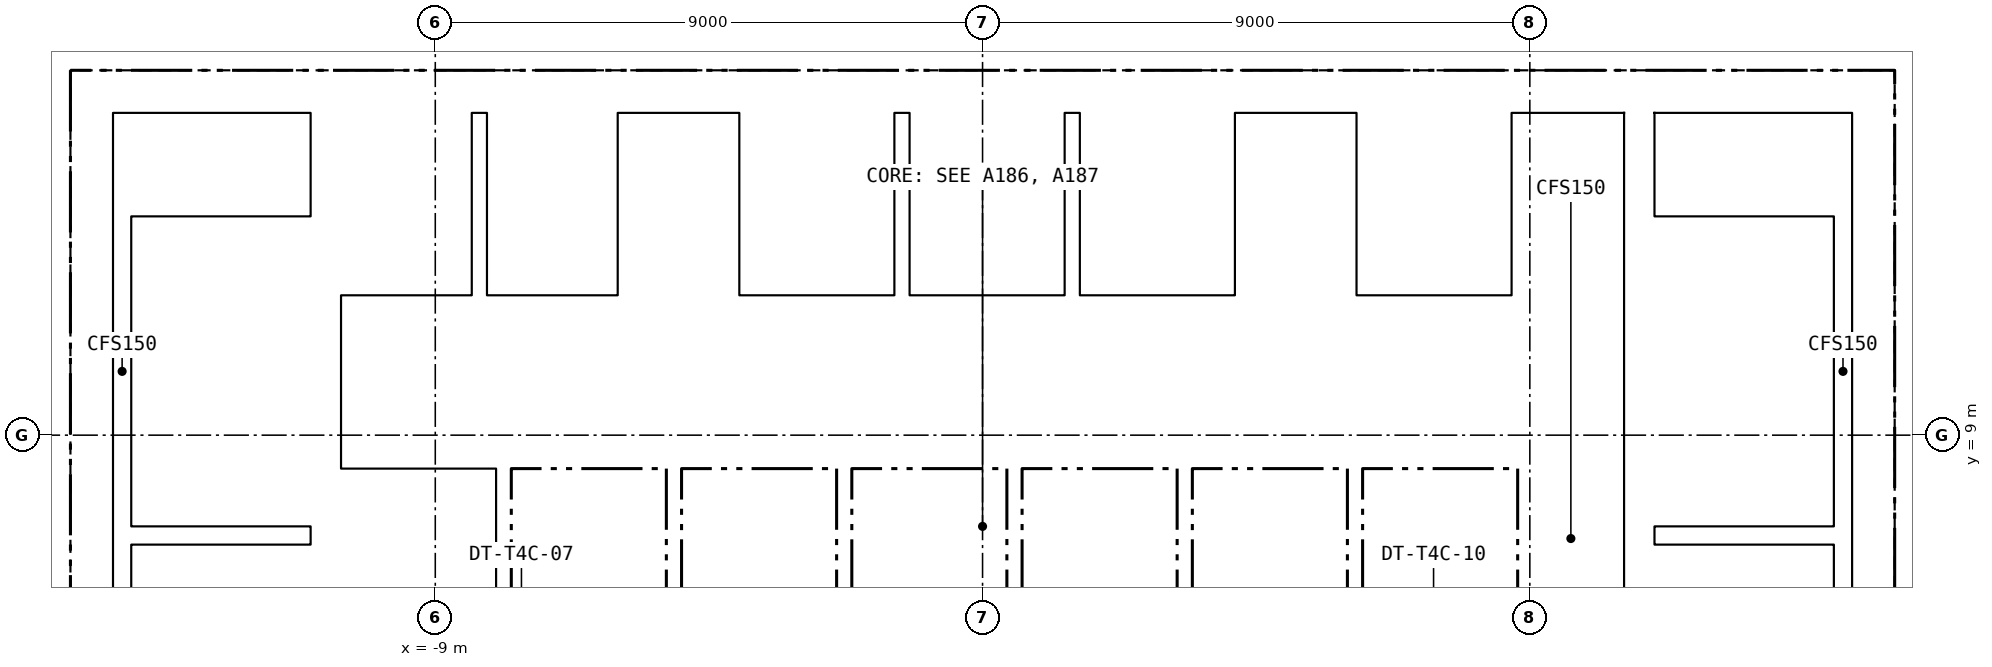
"""IFC4 building model, lengths in metres.
Left out: names, types, materials, properties, quantities, classifications, styles, units other than length and angle.
Written with IfcOpenShell. Run it as: python <this file> out.ifc"""

import sys

from ifc_helpers import new_model, si_unit, direction, frame, frame_2d, origin, place, context, subcontext, project, spatial, rectangle, extrude, element, fill, save


model = new_model("IFC4")
c1 = context("Model", 3, precision=1e-05, world=origin(), true_north=direction((0.0, 1.0)))
c2 = subcontext(c1, "Body", "Model", "MODEL_VIEW")
j1 = project(units=[si_unit("LENGTHUNIT", "METRE"), si_unit("PLANEANGLEUNIT", "RADIAN")], contexts=[c1])
p1 = place(None, origin())
s1 = spatial("IfcSite", under=j1, at=p1, CompositionType="ELEMENT")
p2 = place(p1, origin())
s2 = spatial("IfcBuilding", under=s1, at=p2, CompositionType="ELEMENT")
p3 = place(p2, frame((0.0, 0.0, 192.7)))
s3 = spatial("IfcBuildingStorey", under=s2, at=p3, CompositionType="ELEMENT", Elevation=192.7)
p4 = place(p3, frame((-15.0, 14.65, -0.15), z_axis=(0.0, 0.0, 1.0), x_axis=(1.0, 0.0, 0.0)))
e1 = element("IfcWall", 1, at=p4, inside=s3, PredefinedType="SOLIDWALL", context=c2, shape_type="SweptSolid", body=[
    extrude(rectangle(XDim=30.0, YDim=0.7, at=frame_2d((15.0, 0.0))), origin(), (0.0, 0.0, 1.0), 3.65),
])
p5 = place(p4, frame((9.25, 0.0, 0.15)))
e2 = element("IfcOpeningElement", 2, at=p5, cuts=e1, PredefinedType="OPENING", context=c2, shape_type="SweptSolid", body=[
    extrude(rectangle(XDim=1.5, YDim=2.1, at=frame_2d((0.75, 1.05))), frame((0.0, 0.36, 0.0), z_axis=(0.0, -1.0, 0.0), x_axis=(1.0, 0.0, 0.0)), (0.0, 0.0, 1.0), 0.72),
])
p6 = place(p4, frame((19.4, 0.0, 0.15)))
e3 = element("IfcOpeningElement", 3, at=p6, cuts=e1, PredefinedType="OPENING", context=c2, shape_type="SweptSolid", body=[
    extrude(rectangle(XDim=1.5, YDim=2.1, at=frame_2d((0.75, 1.05))), frame((0.0, 0.36, 0.0), z_axis=(0.0, -1.0, 0.0), x_axis=(1.0, 0.0, 0.0)), (0.0, 0.0, 1.0), 0.72),
])
p7 = place(p4, frame((1.5, 0.0, 0.15)))
e4 = element("IfcOpeningElement", 4, at=p7, cuts=e1, PredefinedType="OPENING", context=c2, shape_type="SweptSolid", body=[
    extrude(rectangle(XDim=1.2, YDim=2.1, at=frame_2d((0.6, 1.05))), frame((0.0, 0.36, 0.0), z_axis=(0.0, -1.0, 0.0), x_axis=(1.0, 0.0, 0.0)), (0.0, 0.0, 1.0), 0.72),
])
p8 = place(p4, frame((27.3, 0.0, 0.15)))
e5 = element("IfcOpeningElement", 5, at=p8, cuts=e1, PredefinedType="OPENING", context=c2, shape_type="SweptSolid", body=[
    extrude(rectangle(XDim=1.2, YDim=2.1, at=frame_2d((0.6, 1.05))), frame((0.0, 0.36, 0.0), z_axis=(0.0, -1.0, 0.0), x_axis=(1.0, 0.0, 0.0)), (0.0, 0.0, 1.0), 0.72),
])
for number, where, z_axis, x_axis in (
    (6, (-14.65, 0.7, -0.15), (0.0, 0.0, 1.0), (0.0, 1.0, 0.0)),
    (7, (14.65, 0.7, -0.15), (0.0, 0.0, 1.0), (0.0, 1.0, 0.0)),
):
    element("IfcWall", number, at=place(p3, frame(where, z_axis=z_axis, x_axis=x_axis)), inside=s3, PredefinedType="SOLIDWALL", context=c2, shape_type="SweptSolid", body=[
        extrude(rectangle(XDim=13.6, YDim=0.7, at=frame_2d((6.8, 0.0))), origin(), (0.0, 0.0, 1.0), 3.65),
    ])
for number, where, z_axis, x_axis in (
    (8, (-10.8, 0.7, -0.15), (0.0, 0.0, 1.0), (0.0, 1.0, 0.0)),
    (9, (10.8, 0.7, -0.15), (0.0, 0.0, 1.0), (0.0, 1.0, 0.0)),
):
    element("IfcWall", number, at=place(p3, frame(where, z_axis=z_axis, x_axis=x_axis)), inside=s3, PredefinedType="SOLIDWALL", context=c2, shape_type="SweptSolid", body=[
        extrude(rectangle(XDim=13.6, YDim=0.5, at=frame_2d((6.8, 0.0))), origin(), (0.0, 0.0, 1.0), 3.65),
    ])
p9 = place(p3, frame((-10.55, 8.55, 0.0), z_axis=(0.0, 0.0, 1.0), x_axis=(1.0, 0.0, 0.0)))
e10 = element("IfcWall", 10, at=p9, inside=s3, PredefinedType="PARTITIONING", context=c2, shape_type="SweptSolid", body=[
    extrude(rectangle(XDim=21.1, YDim=0.2, at=frame_2d((10.55, 0.0))), origin(), (0.0, 0.0, 1.0), 3.5),
])
p10 = place(p9, frame((0.675, 0.0, 0.0)))
e11 = element("IfcOpeningElement", 11, at=p10, cuts=e10, PredefinedType="OPENING", context=c2, shape_type="SweptSolid", body=[
    extrude(rectangle(XDim=1.2, YDim=2.1, at=frame_2d((0.6, 1.05))), frame((0.0, 0.11, 0.0), z_axis=(0.0, -1.0, 0.0), x_axis=(1.0, 0.0, 0.0)), (0.0, 0.0, 1.0), 0.22),
])
p11 = place(p9, frame((3.475, 0.0, 0.0)))
e12 = element("IfcOpeningElement", 12, at=p11, cuts=e10, PredefinedType="OPENING", context=c2, shape_type="SweptSolid", body=[
    extrude(rectangle(XDim=1.2, YDim=2.1, at=frame_2d((0.6, 1.05))), frame((0.0, 0.11, 0.0), z_axis=(0.0, -1.0, 0.0), x_axis=(1.0, 0.0, 0.0)), (0.0, 0.0, 1.0), 0.22),
])
p12 = place(p9, frame((6.275, 0.0, 0.0)))
e13 = element("IfcOpeningElement", 13, at=p12, cuts=e10, PredefinedType="OPENING", context=c2, shape_type="SweptSolid", body=[
    extrude(rectangle(XDim=1.2, YDim=2.1, at=frame_2d((0.6, 1.05))), frame((0.0, 0.11, 0.0), z_axis=(0.0, -1.0, 0.0), x_axis=(1.0, 0.0, 0.0)), (0.0, 0.0, 1.0), 0.22),
])
p13 = place(p9, frame((9.075, 0.0, 0.0)))
e14 = element("IfcOpeningElement", 14, at=p13, cuts=e10, PredefinedType="OPENING", context=c2, shape_type="SweptSolid", body=[
    extrude(rectangle(XDim=1.2, YDim=2.1, at=frame_2d((0.6, 1.05))), frame((0.0, 0.11, 0.0), z_axis=(0.0, -1.0, 0.0), x_axis=(1.0, 0.0, 0.0)), (0.0, 0.0, 1.0), 0.22),
])
p14 = place(p9, frame((11.875, 0.0, 0.0)))
e15 = element("IfcOpeningElement", 15, at=p14, cuts=e10, PredefinedType="OPENING", context=c2, shape_type="SweptSolid", body=[
    extrude(rectangle(XDim=1.2, YDim=2.1, at=frame_2d((0.6, 1.05))), frame((0.0, 0.11, 0.0), z_axis=(0.0, -1.0, 0.0), x_axis=(1.0, 0.0, 0.0)), (0.0, 0.0, 1.0), 0.22),
])
p15 = place(p9, frame((14.675, 0.0, 0.0)))
e16 = element("IfcOpeningElement", 16, at=p15, cuts=e10, PredefinedType="OPENING", context=c2, shape_type="SweptSolid", body=[
    extrude(rectangle(XDim=1.2, YDim=2.1, at=frame_2d((0.6, 1.05))), frame((0.0, 0.11, 0.0), z_axis=(0.0, -1.0, 0.0), x_axis=(1.0, 0.0, 0.0)), (0.0, 0.0, 1.0), 0.22),
])
p16 = place(p9, frame((17.475, 0.0, 0.0)))
e17 = element("IfcOpeningElement", 17, at=p16, cuts=e10, PredefinedType="OPENING", context=c2, shape_type="SweptSolid", body=[
    extrude(rectangle(XDim=1.2, YDim=2.1, at=frame_2d((0.6, 1.05))), frame((0.0, 0.11, 0.0), z_axis=(0.0, -1.0, 0.0), x_axis=(1.0, 0.0, 0.0)), (0.0, 0.0, 1.0), 0.22),
])
p17 = place(p9, frame((19.9, 0.0, 0.0)))
e18 = element("IfcOpeningElement", 18, at=p17, cuts=e10, PredefinedType="OPENING", context=c2, shape_type="SweptSolid", body=[
    extrude(rectangle(XDim=0.9, YDim=2.1, at=frame_2d((0.45, 1.05))), frame((0.0, 0.11, 0.0), z_axis=(0.0, -1.0, 0.0), x_axis=(1.0, 0.0, 0.0)), (0.0, 0.0, 1.0), 0.22),
])
p18 = place(p3, frame((-10.55, 11.2, 0.0), z_axis=(0.0, 0.0, 1.0), x_axis=(1.0, 0.0, 0.0)))
e19 = element("IfcWall", 19, at=p18, inside=s3, PredefinedType="PARTITIONING", context=c2, shape_type="SweptSolid", body=[
    extrude(rectangle(XDim=4.8, YDim=0.2, at=frame_2d((2.4, 0.0))), origin(), (0.0, 0.0, 1.0), 3.5),
])
p19 = place(p18, frame((0.525, 0.0, 0.0)))
e20 = element("IfcOpeningElement", 20, at=p19, cuts=e19, PredefinedType="OPENING", context=c2, shape_type="SweptSolid", body=[
    extrude(rectangle(XDim=1.1, YDim=2.1, at=frame_2d((0.55, 1.05))), frame((0.0, 0.11, 0.0), z_axis=(0.0, -1.0, 0.0), x_axis=(1.0, 0.0, 0.0)), (0.0, 0.0, 1.0), 0.22),
])
p20 = place(p18, frame((2.925, 0.0, 0.0)))
e21 = element("IfcOpeningElement", 21, at=p20, cuts=e19, PredefinedType="OPENING", context=c2, shape_type="SweptSolid", body=[
    extrude(rectangle(XDim=1.1, YDim=2.1, at=frame_2d((0.55, 1.05))), frame((0.0, 0.11, 0.0), z_axis=(0.0, -1.0, 0.0), x_axis=(1.0, 0.0, 0.0)), (0.0, 0.0, 1.0), 0.22),
])
p21 = place(p3, frame((-4.25, 11.2, 0.0), z_axis=(0.0, 0.0, 1.0), x_axis=(1.0, 0.0, 0.0)))
e22 = element("IfcWall", 22, at=p21, inside=s3, PredefinedType="PARTITIONING", context=c2, shape_type="SweptSolid", body=[
    extrude(rectangle(XDim=8.65, YDim=0.2, at=frame_2d((4.325, 0.0))), origin(), (0.0, 0.0, 1.0), 3.5),
])
p22 = place(p21, frame((0.825, 0.0, 0.0)))
e23 = element("IfcOpeningElement", 23, at=p22, cuts=e22, PredefinedType="OPENING", context=c2, shape_type="SweptSolid", body=[
    extrude(rectangle(XDim=1.4, YDim=2.1, at=frame_2d((0.7, 1.05))), frame((0.0, 0.11, 0.0), z_axis=(0.0, -1.0, 0.0), x_axis=(1.0, 0.0, 0.0)), (0.0, 0.0, 1.0), 0.22),
])
p23 = place(p21, frame((3.625, 0.0, 0.0)))
e24 = element("IfcOpeningElement", 24, at=p23, cuts=e22, PredefinedType="OPENING", context=c2, shape_type="SweptSolid", body=[
    extrude(rectangle(XDim=1.4, YDim=2.1, at=frame_2d((0.7, 1.05))), frame((0.0, 0.11, 0.0), z_axis=(0.0, -1.0, 0.0), x_axis=(1.0, 0.0, 0.0)), (0.0, 0.0, 1.0), 0.22),
])
p24 = place(p3, frame((5.9, 11.2, 0.0), z_axis=(0.0, 0.0, 1.0), x_axis=(1.0, 0.0, 0.0)))
e25 = element("IfcWall", 25, at=p24, inside=s3, PredefinedType="PARTITIONING", context=c2, shape_type="SweptSolid", body=[
    extrude(rectangle(XDim=4.65, YDim=0.2, at=frame_2d((2.325, 0.0))), origin(), (0.0, 0.0, 1.0), 3.5),
])
p25 = place(p24, frame((3.4, 0.0, 0.0)))
e26 = element("IfcOpeningElement", 26, at=p25, cuts=e25, PredefinedType="OPENING", context=c2, shape_type="SweptSolid", body=[
    extrude(rectangle(XDim=0.9, YDim=2.1, at=frame_2d((0.45, 1.05))), frame((0.0, 0.11, 0.0), z_axis=(0.0, -1.0, 0.0), x_axis=(1.0, 0.0, 0.0)), (0.0, 0.0, 1.0), 0.22),
])
p26 = place(p3, frame((-4.125, 8.65, 0.0), z_axis=(0.0, 0.0, 1.0), x_axis=(0.0, 1.0, 0.0)))
e27 = element("IfcWall", 27, at=p26, inside=s3, PredefinedType="PARTITIONING", context=c2, shape_type="SweptSolid", body=[
    extrude(rectangle(XDim=2.45, YDim=0.25, at=frame_2d((1.225, 0.0))), origin(), (0.0, 0.0, 1.0), 3.5),
])
p27 = place(p26, frame((0.625, 0.0, 0.0)))
e28 = element("IfcOpeningElement", 28, at=p27, cuts=e27, PredefinedType="OPENING", context=c2, shape_type="SweptSolid", body=[
    extrude(rectangle(XDim=1.2, YDim=2.1, at=frame_2d((0.6, 1.05))), frame((0.0, 0.135, 0.0), z_axis=(0.0, -1.0, 0.0), x_axis=(1.0, 0.0, 0.0)), (0.0, 0.0, 1.0), 0.27),
])
for number, where, z_axis, x_axis in (
    (29, (-7.875, 6.15, 0.0), (0.0, 0.0, 1.0), (0.0, 1.0, 0.0)),
    (30, (-5.075, 6.15, 0.0), (0.0, 0.0, 1.0), (0.0, 1.0, 0.0)),
    (31, (-2.275, 6.15, 0.0), (0.0, 0.0, 1.0), (0.0, 1.0, 0.0)),
    (32, (0.525, 6.15, 0.0), (0.0, 0.0, 1.0), (0.0, 1.0, 0.0)),
    (33, (3.325, 6.15, 0.0), (0.0, 0.0, 1.0), (0.0, 1.0, 0.0)),
    (34, (6.125, 6.15, 0.0), (0.0, 0.0, 1.0), (0.0, 1.0, 0.0)),
    (35, (8.925, 6.15, 0.0), (0.0, 0.0, 1.0), (0.0, 1.0, 0.0)),
):
    element("IfcWall", number, at=place(p3, frame(where, z_axis=z_axis, x_axis=x_axis)), inside=s3, PredefinedType="PARTITIONING", context=c2, shape_type="SweptSolid", body=[
        extrude(rectangle(XDim=2.3, YDim=0.25, at=frame_2d((1.15, 0.0))), origin(), (0.0, 0.0, 1.0), 3.5),
    ])
for number, where, z_axis, x_axis in (
    (36, (-8.275, 11.3, 0.0), (0.0, 0.0, 1.0), (0.0, 1.0, 0.0)),
    (37, (-5.875, 11.3, 0.0), (0.0, 0.0, 1.0), (0.0, 1.0, 0.0)),
    (38, (-4.125, 11.3, 0.0), (0.0, 0.0, 1.0), (0.0, 1.0, 0.0)),
    (39, (-1.325, 11.3, 0.0), (0.0, 0.0, 1.0), (0.0, 1.0, 0.0)),
    (40, (1.475, 11.3, 0.0), (0.0, 0.0, 1.0), (0.0, 1.0, 0.0)),
    (41, (4.275, 11.3, 0.0), (0.0, 0.0, 1.0), (0.0, 1.0, 0.0)),
    (42, (6.025, 11.3, 0.0), (0.0, 0.0, 1.0), (0.0, 1.0, 0.0)),
    (43, (8.825, 11.3, 0.0), (0.0, 0.0, 1.0), (0.0, 1.0, 0.0)),
):
    element("IfcWall", number, at=place(p3, frame(where, z_axis=z_axis, x_axis=x_axis)), inside=s3, PredefinedType="PARTITIONING", context=c2, shape_type="SweptSolid", body=[
        extrude(rectangle(XDim=3.0, YDim=0.25, at=frame_2d((1.5, 0.0))), origin(), (0.0, 0.0, 1.0), 3.5),
    ])
p28 = place(p3, frame((-14.0, 7.35, 0.0), z_axis=(0.0, 0.0, 1.0), x_axis=(1.0, 0.0, 0.0)))
e44 = element("IfcWall", 44, at=p28, inside=s3, PredefinedType="SOLIDWALL", context=c2, shape_type="SweptSolid", body=[
    extrude(rectangle(XDim=2.95, YDim=0.3, at=frame_2d((1.475, 0.0))), origin(), (0.0, 0.0, 1.0), 3.5),
])
p29 = place(p3, frame((-14.15, 0.7, 0.0), z_axis=(0.0, 0.0, 1.0), x_axis=(0.0, 1.0, 0.0)))
e45 = element("IfcWall", 45, at=p29, inside=s3, PredefinedType="SOLIDWALL", context=c2, shape_type="SweptSolid", body=[
    extrude(rectangle(XDim=13.6, YDim=0.3, at=frame_2d((6.8, 0.0))), origin(), (0.0, 0.0, 1.0), 3.5),
])
p30 = place(p3, frame((11.05, 7.35, 0.0), z_axis=(0.0, 0.0, 1.0), x_axis=(1.0, 0.0, 0.0)))
e46 = element("IfcWall", 46, at=p30, inside=s3, PredefinedType="SOLIDWALL", context=c2, shape_type="SweptSolid", body=[
    extrude(rectangle(XDim=2.95, YDim=0.3, at=frame_2d((1.475, 0.0))), origin(), (0.0, 0.0, 1.0), 3.5),
])
p31 = place(p3, frame((14.15, 0.7, 0.0), z_axis=(0.0, 0.0, 1.0), x_axis=(0.0, 1.0, 0.0)))
e47 = element("IfcWall", 47, at=p31, inside=s3, PredefinedType="SOLIDWALL", context=c2, shape_type="SweptSolid", body=[
    extrude(rectangle(XDim=13.6, YDim=0.3, at=frame_2d((6.8, 0.0))), origin(), (0.0, 0.0, 1.0), 3.5),
])
p32 = place(p27, origin())
e48 = element("IfcDoor", 48, at=p32, inside=s3, OperationType="SINGLE_SWING_LEFT", PredefinedType="DOOR", context=c2, shape_type="SweptSolid", body=[
    extrude(rectangle(XDim=1.2, YDim=2.1, at=frame_2d((0.6, 1.05))), frame((0.0, 0.025, 0.0), z_axis=(0.0, -1.0, 0.0), x_axis=(1.0, 0.0, 0.0)), (0.0, 0.0, 1.0), 0.05),
])
fill(e28, e48)
p33 = place(p10, origin())
e49 = element("IfcDoor", 49, at=p33, inside=s3, OperationType="DOUBLE_DOOR_SLIDING", PredefinedType="DOOR", context=c2, shape_type="SweptSolid", body=[
    extrude(rectangle(XDim=1.2, YDim=2.1, at=frame_2d((0.6, 1.05))), frame((0.0, 0.025, 0.0), z_axis=(0.0, -1.0, 0.0), x_axis=(1.0, 0.0, 0.0)), (0.0, 0.0, 1.0), 0.05),
])
fill(e11, e49)
p34 = place(p11, origin())
e50 = element("IfcDoor", 50, at=p34, inside=s3, OperationType="DOUBLE_DOOR_SLIDING", PredefinedType="DOOR", context=c2, shape_type="SweptSolid", body=[
    extrude(rectangle(XDim=1.2, YDim=2.1, at=frame_2d((0.6, 1.05))), frame((0.0, 0.025, 0.0), z_axis=(0.0, -1.0, 0.0), x_axis=(1.0, 0.0, 0.0)), (0.0, 0.0, 1.0), 0.05),
])
fill(e12, e50)
p35 = place(p12, origin())
e51 = element("IfcDoor", 51, at=p35, inside=s3, OperationType="DOUBLE_DOOR_SLIDING", PredefinedType="DOOR", context=c2, shape_type="SweptSolid", body=[
    extrude(rectangle(XDim=1.2, YDim=2.1, at=frame_2d((0.6, 1.05))), frame((0.0, 0.025, 0.0), z_axis=(0.0, -1.0, 0.0), x_axis=(1.0, 0.0, 0.0)), (0.0, 0.0, 1.0), 0.05),
])
fill(e13, e51)
p36 = place(p13, origin())
e52 = element("IfcDoor", 52, at=p36, inside=s3, OperationType="DOUBLE_DOOR_SLIDING", PredefinedType="DOOR", context=c2, shape_type="SweptSolid", body=[
    extrude(rectangle(XDim=1.2, YDim=2.1, at=frame_2d((0.6, 1.05))), frame((0.0, 0.025, 0.0), z_axis=(0.0, -1.0, 0.0), x_axis=(1.0, 0.0, 0.0)), (0.0, 0.0, 1.0), 0.05),
])
fill(e14, e52)
p37 = place(p14, origin())
e53 = element("IfcDoor", 53, at=p37, inside=s3, OperationType="DOUBLE_DOOR_SLIDING", PredefinedType="DOOR", context=c2, shape_type="SweptSolid", body=[
    extrude(rectangle(XDim=1.2, YDim=2.1, at=frame_2d((0.6, 1.05))), frame((0.0, 0.025, 0.0), z_axis=(0.0, -1.0, 0.0), x_axis=(1.0, 0.0, 0.0)), (0.0, 0.0, 1.0), 0.05),
])
fill(e15, e53)
p38 = place(p15, origin())
e54 = element("IfcDoor", 54, at=p38, inside=s3, OperationType="DOUBLE_DOOR_SLIDING", PredefinedType="DOOR", context=c2, shape_type="SweptSolid", body=[
    extrude(rectangle(XDim=1.2, YDim=2.1, at=frame_2d((0.6, 1.05))), frame((0.0, 0.025, 0.0), z_axis=(0.0, -1.0, 0.0), x_axis=(1.0, 0.0, 0.0)), (0.0, 0.0, 1.0), 0.05),
])
fill(e16, e54)
p39 = place(p16, origin())
e55 = element("IfcDoor", 55, at=p39, inside=s3, OperationType="DOUBLE_DOOR_SLIDING", PredefinedType="DOOR", context=c2, shape_type="SweptSolid", body=[
    extrude(rectangle(XDim=1.2, YDim=2.1, at=frame_2d((0.6, 1.05))), frame((0.0, 0.025, 0.0), z_axis=(0.0, -1.0, 0.0), x_axis=(1.0, 0.0, 0.0)), (0.0, 0.0, 1.0), 0.05),
])
fill(e17, e55)
p40 = place(p17, origin())
e56 = element("IfcDoor", 56, at=p40, inside=s3, OperationType="SINGLE_SWING_RIGHT", PredefinedType="DOOR", context=c2, shape_type="SweptSolid", body=[
    extrude(rectangle(XDim=0.9, YDim=2.1, at=frame_2d((0.45, 1.05))), frame((0.0, 0.025, 0.0), z_axis=(0.0, -1.0, 0.0), x_axis=(1.0, 0.0, 0.0)), (0.0, 0.0, 1.0), 0.05),
])
fill(e18, e56)
p41 = place(p19, origin())
e57 = element("IfcDoor", 57, at=p41, inside=s3, OperationType="DOUBLE_DOOR_SLIDING", PredefinedType="DOOR", context=c2, shape_type="SweptSolid", body=[
    extrude(rectangle(XDim=1.1, YDim=2.1, at=frame_2d((0.55, 1.05))), frame((0.0, 0.025, 0.0), z_axis=(0.0, -1.0, 0.0), x_axis=(1.0, 0.0, 0.0)), (0.0, 0.0, 1.0), 0.05),
])
fill(e20, e57)
p42 = place(p20, origin())
e58 = element("IfcDoor", 58, at=p42, inside=s3, OperationType="DOUBLE_DOOR_SLIDING", PredefinedType="DOOR", context=c2, shape_type="SweptSolid", body=[
    extrude(rectangle(XDim=1.1, YDim=2.1, at=frame_2d((0.55, 1.05))), frame((0.0, 0.025, 0.0), z_axis=(0.0, -1.0, 0.0), x_axis=(1.0, 0.0, 0.0)), (0.0, 0.0, 1.0), 0.05),
])
fill(e21, e58)
p43 = place(p22, origin())
e59 = element("IfcDoor", 59, at=p43, inside=s3, OperationType="DOUBLE_DOOR_SLIDING", PredefinedType="DOOR", context=c2, shape_type="SweptSolid", body=[
    extrude(rectangle(XDim=1.4, YDim=2.1, at=frame_2d((0.7, 1.05))), frame((0.0, 0.025, 0.0), z_axis=(0.0, -1.0, 0.0), x_axis=(1.0, 0.0, 0.0)), (0.0, 0.0, 1.0), 0.05),
])
fill(e23, e59)
p44 = place(p23, origin())
e60 = element("IfcDoor", 60, at=p44, inside=s3, OperationType="DOUBLE_DOOR_SLIDING", PredefinedType="DOOR", context=c2, shape_type="SweptSolid", body=[
    extrude(rectangle(XDim=1.4, YDim=2.1, at=frame_2d((0.7, 1.05))), frame((0.0, 0.025, 0.0), z_axis=(0.0, -1.0, 0.0), x_axis=(1.0, 0.0, 0.0)), (0.0, 0.0, 1.0), 0.05),
])
fill(e24, e60)
p45 = place(p25, origin())
e61 = element("IfcDoor", 61, at=p45, inside=s3, OperationType="SINGLE_SWING_LEFT", PredefinedType="DOOR", context=c2, shape_type="SweptSolid", body=[
    extrude(rectangle(XDim=0.9, YDim=2.1, at=frame_2d((0.45, 1.05))), frame((0.0, 0.025, 0.0), z_axis=(0.0, -1.0, 0.0), x_axis=(1.0, 0.0, 0.0)), (0.0, 0.0, 1.0), 0.05),
])
fill(e26, e61)
p46 = place(p5, origin())
e62 = element("IfcDoor", 62, at=p46, inside=s3, OperationType="DOUBLE_DOOR_SINGLE_SWING", PredefinedType="DOOR", context=c2, shape_type="SweptSolid", body=[
    extrude(rectangle(XDim=1.5, YDim=2.1, at=frame_2d((0.75, 1.05))), frame((0.0, 0.025, 0.0), z_axis=(0.0, -1.0, 0.0), x_axis=(1.0, 0.0, 0.0)), (0.0, 0.0, 1.0), 0.05),
])
fill(e2, e62)
p47 = place(p6, origin())
e63 = element("IfcDoor", 63, at=p47, inside=s3, OperationType="DOUBLE_DOOR_SINGLE_SWING", PredefinedType="DOOR", context=c2, shape_type="SweptSolid", body=[
    extrude(rectangle(XDim=1.5, YDim=2.1, at=frame_2d((0.75, 1.05))), frame((0.0, 0.025, 0.0), z_axis=(0.0, -1.0, 0.0), x_axis=(1.0, 0.0, 0.0)), (0.0, 0.0, 1.0), 0.05),
])
fill(e3, e63)
p48 = place(p7, origin())
e64 = element("IfcDoor", 64, at=p48, inside=s3, OperationType="SINGLE_SWING_RIGHT", PredefinedType="DOOR", context=c2, shape_type="SweptSolid", body=[
    extrude(rectangle(XDim=1.2, YDim=2.1, at=frame_2d((0.6, 1.05))), frame((0.0, 0.025, 0.0), z_axis=(0.0, -1.0, 0.0), x_axis=(1.0, 0.0, 0.0)), (0.0, 0.0, 1.0), 0.05),
])
fill(e4, e64)
p49 = place(p8, origin())
e65 = element("IfcDoor", 65, at=p49, inside=s3, OperationType="SINGLE_SWING_LEFT", PredefinedType="DOOR", context=c2, shape_type="SweptSolid", body=[
    extrude(rectangle(XDim=1.2, YDim=2.1, at=frame_2d((0.6, 1.05))), frame((0.0, 0.025, 0.0), z_axis=(0.0, -1.0, 0.0), x_axis=(1.0, 0.0, 0.0)), (0.0, 0.0, 1.0), 0.05),
])
fill(e5, e65)
save(model, sys.argv[1])
